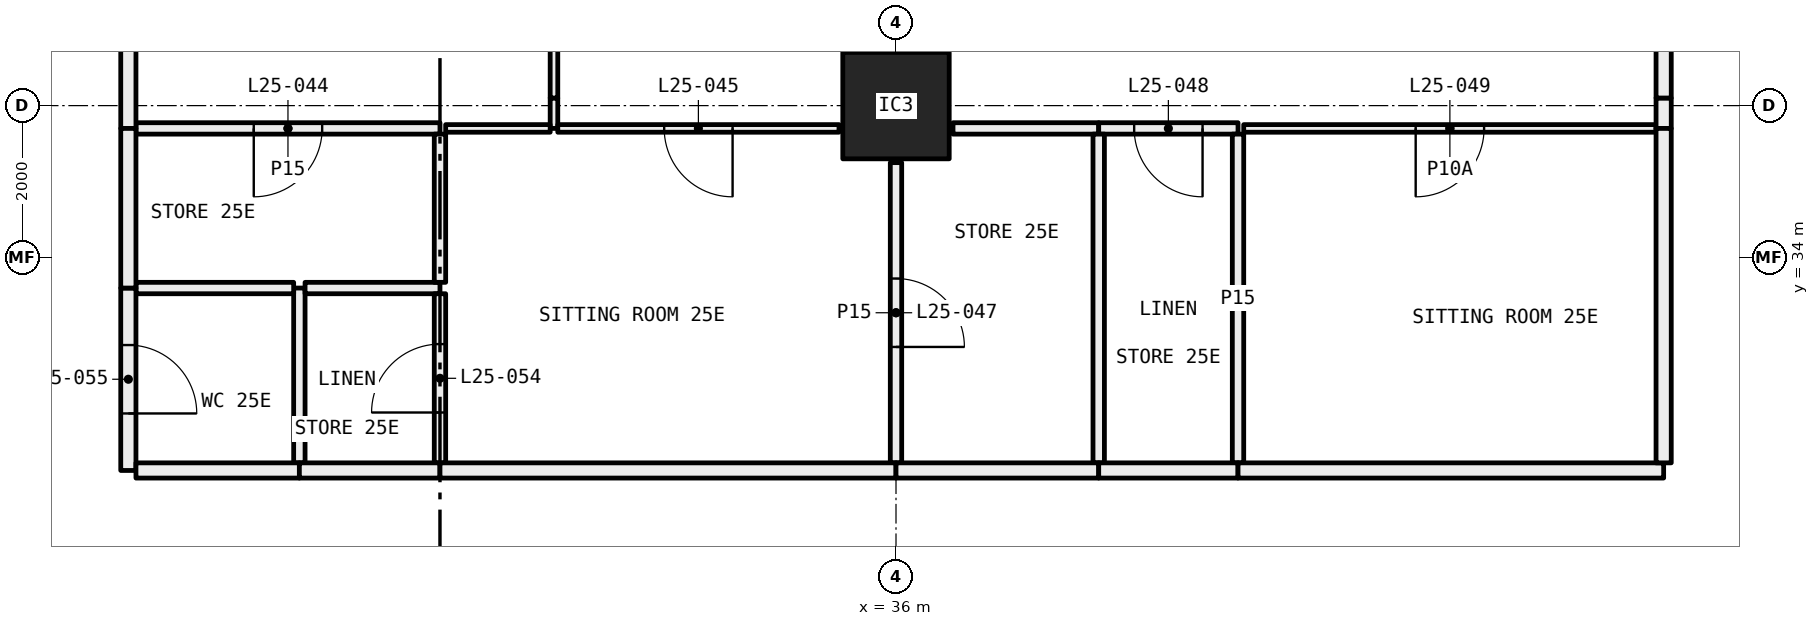
"""IFC4 building model, lengths in metres.
Left out: names, types, materials, properties, quantities, classifications, styles, units other than length and angle.
Written with IfcOpenShell. Run it as: python <this file> out.ifc"""

import sys

from ifc_helpers import new_model, si_unit, direction, frame, frame_2d, origin, origin_2d, place, context, subcontext, project, spatial, rectangle, hollow_rectangle, extrude, element, fill, save


model = new_model("IFC4")
c1 = context("Model", 3, precision=1e-05, world=origin(), true_north=direction((0.0, 1.0)))
c2 = subcontext(c1, "Body", "Model", "MODEL_VIEW")
j1 = project(units=[si_unit("LENGTHUNIT", "METRE"), si_unit("PLANEANGLEUNIT", "RADIAN")], contexts=[c1])
p1 = place(None, origin())
s1 = spatial("IfcSite", under=j1, at=p1, CompositionType="ELEMENT")
p2 = place(p1, origin())
s2 = spatial("IfcBuilding", under=s1, at=p2, CompositionType="ELEMENT")
p3 = place(p2, frame((0.0, 0.0, 100.05)))
s3 = spatial("IfcBuildingStorey", under=s2, at=p3, CompositionType="ELEMENT", Elevation=100.05)
p4 = place(p3, frame((36.0, 36.0, 0.0), z_axis=(0.0, 0.0, 1.0), x_axis=(1.0, 0.0, 0.0)))
e1 = element("IfcColumn", 1, at=p4, inside=s3, PredefinedType="COLUMN", context=c2, shape_type="SweptSolid", body=[
    extrude(hollow_rectangle(XDim=1.4, YDim=1.4, WallThickness=0.06, at=origin_2d()), origin(), (0.0, 0.0, 1.0), 3.05),
])
p5 = place(p3, frame((31.5, 35.7, 0.0), z_axis=(0.0, 0.0, 1.0), x_axis=(0.0, 1.0, 0.0)))
e2 = element("IfcWall", 2, at=p5, inside=s3, PredefinedType="PARTITIONING", context=c2, shape_type="SweptSolid", body=[
    extrude(rectangle(XDim=0.4, YDim=0.1, at=frame_2d((0.2, 0.0))), origin(), (0.0, 0.0, 1.0), 2.45),
])
p6 = place(p3, frame((31.5, 36.1, 0.0), z_axis=(0.0, 0.0, 1.0), x_axis=(0.0, 1.0, 0.0)))
e3 = element("IfcWall", 3, at=p6, inside=s3, PredefinedType="PARTITIONING", context=c2, shape_type="SweptSolid", body=[
    extrude(rectangle(XDim=5.825, YDim=0.1, at=frame_2d((2.913, 0.0))), origin(), (0.0, 0.0, 1.0), 3.05),
])
p7 = place(p6, frame((2.462, 0.0, 0.0)))
e4 = element("IfcOpeningElement", 4, at=p7, cuts=e3, PredefinedType="OPENING", context=c2, shape_type="SweptSolid", body=[
    extrude(rectangle(XDim=0.9, YDim=2.1, at=frame_2d((0.45, 1.05))), frame((0.0, 0.06, 0.0), z_axis=(0.0, -1.0, 0.0), x_axis=(1.0, 0.0, 0.0)), (0.0, 0.0, 1.0), 0.12),
])
p8 = place(p3, frame((26.0, 35.7, 0.0), z_axis=(0.0, 0.0, 1.0), x_axis=(1.0, 0.0, 0.0)))
e5 = element("IfcWall", 5, at=p8, inside=s3, PredefinedType="PARTITIONING", context=c2, shape_type="SweptSolid", body=[
    extrude(rectangle(XDim=4.0, YDim=0.15, at=frame_2d((2.0, 0.0))), origin(), (0.0, 0.0, 1.0), 3.05),
])
p9 = place(p8, frame((1.55, 0.0, 0.0)))
e6 = element("IfcOpeningElement", 6, at=p9, cuts=e5, PredefinedType="OPENING", context=c2, shape_type="SweptSolid", body=[
    extrude(rectangle(XDim=0.9, YDim=2.1, at=frame_2d((0.45, 1.05))), frame((0.0, 0.085, 0.0), z_axis=(0.0, -1.0, 0.0), x_axis=(1.0, 0.0, 0.0)), (0.0, 0.0, 1.0), 0.17),
])
p10 = place(p3, frame((30.075, 35.7, 0.0), z_axis=(0.0, 0.0, 1.0), x_axis=(1.0, 0.0, 0.0)))
e7 = element("IfcWall", 7, at=p10, inside=s3, PredefinedType="PARTITIONING", context=c2, shape_type="SweptSolid", body=[
    extrude(rectangle(XDim=1.375, YDim=0.1, at=frame_2d((0.688, 0.0))), origin(), (0.0, 0.0, 1.0), 3.05),
])
p11 = place(p3, frame((25.9, 41.9, 0.0), z_axis=(0.0, 0.0, 1.0), x_axis=(0.0, -1.0, 0.0)))
e8 = element("IfcWall", 8, at=p11, inside=s3, PredefinedType="PARTITIONING", context=c2, shape_type="SweptSolid", body=[
    extrude(rectangle(XDim=6.2, YDim=0.2, at=frame_2d((3.1, 0.0))), origin(), (0.0, 0.0, 1.0), 2.45),
])
p12 = place(p3, frame((31.55, 35.7, 0.0), z_axis=(0.0, 0.0, 1.0), x_axis=(1.0, 0.0, 0.0)))
e9 = element("IfcWall", 9, at=p12, inside=s3, PredefinedType="PARTITIONING", context=c2, shape_type="SweptSolid", body=[
    extrude(rectangle(XDim=3.7, YDim=0.1, at=frame_2d((1.85, 0.0))), origin(), (0.0, 0.0, 1.0), 3.05),
])
p13 = place(p12, frame((1.4, 0.0, 0.0)))
e10 = element("IfcOpeningElement", 10, at=p13, cuts=e9, PredefinedType="OPENING", context=c2, shape_type="SweptSolid", body=[
    extrude(rectangle(XDim=0.9, YDim=2.1, at=frame_2d((0.45, 1.05))), frame((0.0, 0.06, 0.0), z_axis=(0.0, -1.0, 0.0), x_axis=(1.0, 0.0, 0.0)), (0.0, 0.0, 1.0), 0.12),
])
p14 = place(p3, frame((28.15, 31.3, 0.0), z_axis=(0.0, 0.0, 1.0), x_axis=(0.0, 1.0, 0.0)))
e11 = element("IfcWall", 11, at=p14, inside=s3, PredefinedType="PARTITIONING", context=c2, shape_type="SweptSolid", body=[
    extrude(rectangle(XDim=2.3, YDim=0.15, at=frame_2d((1.15, 0.0))), origin(), (0.0, 0.0, 1.0), 3.05),
])
p15 = place(p3, frame((28.075, 33.6, 0.0), z_axis=(0.0, 0.0, 1.0), x_axis=(-1.0, 0.0, 0.0)))
e12 = element("IfcWall", 12, at=p15, inside=s3, PredefinedType="PARTITIONING", context=c2, shape_type="SweptSolid", body=[
    extrude(rectangle(XDim=2.075, YDim=0.15, at=frame_2d((1.038, 0.0))), origin(), (0.0, 0.0, 1.0), 3.05),
])
p16 = place(p3, frame((25.9, 33.6, 0.0), z_axis=(0.0, 0.0, 1.0), x_axis=(0.0, -1.0, 0.0)))
e13 = element("IfcWall", 13, at=p16, inside=s3, PredefinedType="PARTITIONING", context=c2, shape_type="SweptSolid", body=[
    extrude(rectangle(XDim=2.4, YDim=0.2, at=frame_2d((1.2, 0.0))), origin(), (0.0, 0.0, 1.0), 3.05),
])
p17 = place(p16, frame((0.75, 0.0, 0.0)))
e14 = element("IfcOpeningElement", 14, at=p17, cuts=e13, PredefinedType="OPENING", context=c2, shape_type="SweptSolid", body=[
    extrude(rectangle(XDim=0.9, YDim=2.1, at=frame_2d((0.45, 1.05))), frame((0.0, 0.11, 0.0), z_axis=(0.0, -1.0, 0.0), x_axis=(1.0, 0.0, 0.0)), (0.0, 0.0, 1.0), 0.22),
])
p18 = place(p3, frame((26.0, 31.2, 0.0), z_axis=(0.0, 0.0, 1.0), x_axis=(1.0, 0.0, 0.0)))
e15 = element("IfcWall", 15, at=p18, inside=s3, PredefinedType="PARTITIONING", context=c2, shape_type="SweptSolid", body=[
    extrude(rectangle(XDim=2.15, YDim=0.2, at=frame_2d((1.075, 0.0))), origin(), (0.0, 0.0, 1.0), 3.05),
])
p19 = place(p3, frame((30.0, 33.6, 0.0), z_axis=(0.0, 0.0, 1.0), x_axis=(-1.0, 0.0, 0.0)))
e16 = element("IfcWall", 16, at=p19, inside=s3, PredefinedType="PARTITIONING", context=c2, shape_type="SweptSolid", body=[
    extrude(rectangle(XDim=1.775, YDim=0.15, at=frame_2d((0.887, 0.0))), origin(), (0.0, 0.0, 1.0), 3.05),
])
p20 = place(p3, frame((30.0, 31.3, 0.0), z_axis=(0.0, 0.0, 1.0), x_axis=(0.0, 1.0, 0.0)))
e17 = element("IfcWall", 17, at=p20, inside=s3, PredefinedType="PARTITIONING", context=c2, shape_type="SweptSolid", body=[
    extrude(rectangle(XDim=2.225, YDim=0.15, at=frame_2d((1.112, 0.0))), origin(), (0.0, 0.0, 1.0), 3.05),
])
p21 = place(p20, frame((0.663, 0.0, 0.0)))
e18 = element("IfcOpeningElement", 18, at=p21, cuts=e17, PredefinedType="OPENING", context=c2, shape_type="SweptSolid", body=[
    extrude(rectangle(XDim=0.9, YDim=2.1, at=frame_2d((0.45, 1.05))), frame((0.0, 0.085, 0.0), z_axis=(0.0, -1.0, 0.0), x_axis=(1.0, 0.0, 0.0)), (0.0, 0.0, 1.0), 0.17),
])
p22 = place(p3, frame((28.15, 31.2, 0.0), z_axis=(0.0, 0.0, 1.0), x_axis=(1.0, 0.0, 0.0)))
e19 = element("IfcWall", 19, at=p22, inside=s3, PredefinedType="PARTITIONING", context=c2, shape_type="SweptSolid", body=[
    extrude(rectangle(XDim=1.85, YDim=0.2, at=frame_2d((0.925, 0.0))), origin(), (0.0, 0.0, 1.0), 3.05),
])
p23 = place(p3, frame((30.0, 33.675, 0.0), z_axis=(0.0, 0.0, 1.0), x_axis=(0.0, 1.0, 0.0)))
e20 = element("IfcWall", 20, at=p23, inside=s3, PredefinedType="PARTITIONING", context=c2, shape_type="SweptSolid", body=[
    extrude(rectangle(XDim=1.95, YDim=0.15, at=frame_2d((0.975, 0.0))), origin(), (0.0, 0.0, 1.0), 3.05),
])
p24 = place(p3, frame((25.9, 35.7, 0.0), z_axis=(0.0, 0.0, 1.0), x_axis=(0.0, -1.0, 0.0)))
e21 = element("IfcWall", 21, at=p24, inside=s3, PredefinedType="PARTITIONING", context=c2, shape_type="SweptSolid", body=[
    extrude(rectangle(XDim=2.1, YDim=0.2, at=frame_2d((1.05, 0.0))), origin(), (0.0, 0.0, 1.0), 3.05),
])
p25 = place(p3, frame((36.0, 31.3, 0.0), z_axis=(0.0, 0.0, 1.0), x_axis=(0.0, 1.0, 0.0)))
e22 = element("IfcWall", 22, at=p25, inside=s3, PredefinedType="PARTITIONING", context=c2, shape_type="SweptSolid", body=[
    extrude(rectangle(XDim=3.95, YDim=0.15, at=frame_2d((1.975, 0.0))), origin(), (0.0, 0.0, 1.0), 2.45),
])
p26 = place(p25, frame((1.525, 0.0, 0.0)))
e23 = element("IfcOpeningElement", 23, at=p26, cuts=e22, PredefinedType="OPENING", context=c2, shape_type="SweptSolid", body=[
    extrude(rectangle(XDim=0.9, YDim=2.1, at=frame_2d((0.45, 1.05))), frame((0.0, 0.085, 0.0), z_axis=(0.0, -1.0, 0.0), x_axis=(1.0, 0.0, 0.0)), (0.0, 0.0, 1.0), 0.17),
])
p27 = place(p3, frame((30.0, 31.2, 0.0), z_axis=(0.0, 0.0, 1.0), x_axis=(1.0, 0.0, 0.0)))
e24 = element("IfcWall", 24, at=p27, inside=s3, PredefinedType="PARTITIONING", context=c2, shape_type="SweptSolid", body=[
    extrude(rectangle(XDim=6.0, YDim=0.2, at=frame_2d((3.0, 0.0))), origin(), (0.0, 0.0, 1.0), 2.45),
])
p28 = place(p3, frame((36.75, 35.7, 0.0), z_axis=(0.0, 0.0, 1.0), x_axis=(1.0, 0.0, 0.0)))
e25 = element("IfcWall", 25, at=p28, inside=s3, PredefinedType="PARTITIONING", context=c2, shape_type="SweptSolid", body=[
    extrude(rectangle(XDim=1.917, YDim=0.15, at=frame_2d((0.958, 0.0))), origin(), (0.0, 0.0, 1.0), 3.05),
])
p29 = place(p3, frame((38.667, 35.7, 0.0), z_axis=(0.0, 0.0, 1.0), x_axis=(1.0, 0.0, 0.0)))
e26 = element("IfcWall", 26, at=p29, inside=s3, PredefinedType="PARTITIONING", context=c2, shape_type="SweptSolid", body=[
    extrude(rectangle(XDim=1.833, YDim=0.15, at=frame_2d((0.917, 0.0))), origin(), (0.0, 0.0, 1.0), 3.05),
])
p30 = place(p29, frame((0.467, 0.0, 0.0)))
e27 = element("IfcOpeningElement", 27, at=p30, cuts=e26, PredefinedType="OPENING", context=c2, shape_type="SweptSolid", body=[
    extrude(rectangle(XDim=0.9, YDim=2.1, at=frame_2d((0.45, 1.05))), frame((0.0, 0.085, 0.0), z_axis=(0.0, -1.0, 0.0), x_axis=(1.0, 0.0, 0.0)), (0.0, 0.0, 1.0), 0.17),
])
p31 = place(p3, frame((40.575, 35.7, 0.0), z_axis=(0.0, 0.0, 1.0), x_axis=(1.0, 0.0, 0.0)))
e28 = element("IfcWall", 28, at=p31, inside=s3, PredefinedType="PARTITIONING", context=c2, shape_type="SweptSolid", body=[
    extrude(rectangle(XDim=5.425, YDim=0.1, at=frame_2d((2.712, 0.0))), origin(), (0.0, 0.0, 1.0), 3.05),
])
p32 = place(p31, frame((2.262, 0.0, 0.0)))
e29 = element("IfcOpeningElement", 29, at=p32, cuts=e28, PredefinedType="OPENING", context=c2, shape_type="SweptSolid", body=[
    extrude(rectangle(XDim=0.9, YDim=2.1, at=frame_2d((0.45, 1.05))), frame((0.0, 0.06, 0.0), z_axis=(0.0, -1.0, 0.0), x_axis=(1.0, 0.0, 0.0)), (0.0, 0.0, 1.0), 0.12),
])
p33 = place(p3, frame((46.1, 35.7, 0.0), z_axis=(0.0, 0.0, 1.0), x_axis=(0.0, 1.0, 0.0)))
e30 = element("IfcWall", 30, at=p33, inside=s3, PredefinedType="PARTITIONING", context=c2, shape_type="SweptSolid", body=[
    extrude(rectangle(XDim=0.4, YDim=0.2, at=frame_2d((0.2, 0.0))), origin(), (0.0, 0.0, 1.0), 2.45),
])
p34 = place(p3, frame((46.1, 36.1, 0.0), z_axis=(0.0, 0.0, 1.0), x_axis=(0.0, 1.0, 0.0)))
e31 = element("IfcWall", 31, at=p34, inside=s3, PredefinedType="PARTITIONING", context=c2, shape_type="SweptSolid", body=[
    extrude(rectangle(XDim=5.8, YDim=0.2, at=frame_2d((2.9, 0.0))), origin(), (0.0, 0.0, 1.0), 3.05),
])
p35 = place(p3, frame((38.667, 31.3, 0.0), z_axis=(0.0, 0.0, 1.0), x_axis=(0.0, 1.0, 0.0)))
e32 = element("IfcWall", 32, at=p35, inside=s3, PredefinedType="PARTITIONING", context=c2, shape_type="SweptSolid", body=[
    extrude(rectangle(XDim=4.325, YDim=0.15, at=frame_2d((2.163, 0.0))), origin(), (0.0, 0.0, 1.0), 3.05),
])
p36 = place(p3, frame((36.0, 31.2, 0.0), z_axis=(0.0, 0.0, 1.0), x_axis=(1.0, 0.0, 0.0)))
e33 = element("IfcWall", 33, at=p36, inside=s3, PredefinedType="PARTITIONING", context=c2, shape_type="SweptSolid", body=[
    extrude(rectangle(XDim=2.667, YDim=0.2, at=frame_2d((1.333, 0.0))), origin(), (0.0, 0.0, 1.0), 2.45),
])
p37 = place(p3, frame((40.5, 31.3, 0.0), z_axis=(0.0, 0.0, 1.0), x_axis=(0.0, 1.0, 0.0)))
e34 = element("IfcWall", 34, at=p37, inside=s3, PredefinedType="PARTITIONING", context=c2, shape_type="SweptSolid", body=[
    extrude(rectangle(XDim=4.325, YDim=0.15, at=frame_2d((2.163, 0.0))), origin(), (0.0, 0.0, 1.0), 3.05),
])
p38 = place(p3, frame((38.667, 31.2, 0.0), z_axis=(0.0, 0.0, 1.0), x_axis=(1.0, 0.0, 0.0)))
e35 = element("IfcWall", 35, at=p38, inside=s3, PredefinedType="PARTITIONING", context=c2, shape_type="SweptSolid", body=[
    extrude(rectangle(XDim=1.833, YDim=0.2, at=frame_2d((0.917, 0.0))), origin(), (0.0, 0.0, 1.0), 3.05),
])
p39 = place(p3, frame((40.5, 31.2, 0.0), z_axis=(0.0, 0.0, 1.0), x_axis=(1.0, 0.0, 0.0)))
e36 = element("IfcWall", 36, at=p39, inside=s3, PredefinedType="PARTITIONING", context=c2, shape_type="SweptSolid", body=[
    extrude(rectangle(XDim=5.6, YDim=0.2, at=frame_2d((2.8, 0.0))), origin(), (0.0, 0.0, 1.0), 3.05),
])
p40 = place(p3, frame((46.1, 31.3, 0.0), z_axis=(0.0, 0.0, 1.0), x_axis=(0.0, 1.0, 0.0)))
e37 = element("IfcWall", 37, at=p40, inside=s3, PredefinedType="PARTITIONING", context=c2, shape_type="SweptSolid", body=[
    extrude(rectangle(XDim=4.4, YDim=0.2, at=frame_2d((2.2, 0.0))), origin(), (0.0, 0.0, 1.0), 3.05),
])
p41 = place(p9, frame((0.9, 0.0, 0.0), x_axis=(-1.0, 0.0, 0.0)))
e38 = element("IfcDoor", 38, at=p41, inside=s3, OperationType="SINGLE_SWING_LEFT", PredefinedType="DOOR", context=c2, shape_type="SweptSolid", body=[
    extrude(rectangle(XDim=0.9, YDim=2.1, at=frame_2d((0.45, 1.05))), frame((0.0, 0.025, 0.0), z_axis=(0.0, -1.0, 0.0), x_axis=(1.0, 0.0, 0.0)), (0.0, 0.0, 1.0), 0.05),
])
fill(e6, e38)
p42 = place(p13, frame((0.9, 0.0, 0.0), x_axis=(-1.0, 0.0, 0.0)))
e39 = element("IfcDoor", 39, at=p42, inside=s3, OperationType="SINGLE_SWING_RIGHT", PredefinedType="DOOR", context=c2, shape_type="SweptSolid", body=[
    extrude(rectangle(XDim=0.9, YDim=2.1, at=frame_2d((0.45, 1.05))), frame((0.0, 0.025, 0.0), z_axis=(0.0, -1.0, 0.0), x_axis=(1.0, 0.0, 0.0)), (0.0, 0.0, 1.0), 0.05),
])
fill(e10, e39)
p43 = place(p26, frame((0.9, 0.0, 0.0), x_axis=(-1.0, 0.0, 0.0)))
e40 = element("IfcDoor", 40, at=p43, inside=s3, OperationType="SINGLE_SWING_LEFT", PredefinedType="DOOR", context=c2, shape_type="SweptSolid", body=[
    extrude(rectangle(XDim=0.9, YDim=2.1, at=frame_2d((0.45, 1.05))), frame((0.0, 0.025, 0.0), z_axis=(0.0, -1.0, 0.0), x_axis=(1.0, 0.0, 0.0)), (0.0, 0.0, 1.0), 0.05),
])
fill(e23, e40)
p44 = place(p30, frame((0.9, 0.0, 0.0), x_axis=(-1.0, 0.0, 0.0)))
e41 = element("IfcDoor", 41, at=p44, inside=s3, OperationType="SINGLE_SWING_RIGHT", PredefinedType="DOOR", context=c2, shape_type="SweptSolid", body=[
    extrude(rectangle(XDim=0.9, YDim=2.1, at=frame_2d((0.45, 1.05))), frame((0.0, 0.025, 0.0), z_axis=(0.0, -1.0, 0.0), x_axis=(1.0, 0.0, 0.0)), (0.0, 0.0, 1.0), 0.05),
])
fill(e27, e41)
p45 = place(p32, frame((0.9, 0.0, 0.0), x_axis=(-1.0, 0.0, 0.0)))
e42 = element("IfcDoor", 42, at=p45, inside=s3, OperationType="SINGLE_SWING_LEFT", PredefinedType="DOOR", context=c2, shape_type="SweptSolid", body=[
    extrude(rectangle(XDim=0.9, YDim=2.1, at=frame_2d((0.45, 1.05))), frame((0.0, 0.025, 0.0), z_axis=(0.0, -1.0, 0.0), x_axis=(1.0, 0.0, 0.0)), (0.0, 0.0, 1.0), 0.05),
])
fill(e29, e42)
p46 = place(p21, origin())
e43 = element("IfcDoor", 43, at=p46, inside=s3, OperationType="SINGLE_SWING_RIGHT", PredefinedType="DOOR", context=c2, shape_type="SweptSolid", body=[
    extrude(rectangle(XDim=0.9, YDim=2.1, at=frame_2d((0.45, 1.05))), frame((0.0, 0.025, 0.0), z_axis=(0.0, -1.0, 0.0), x_axis=(1.0, 0.0, 0.0)), (0.0, 0.0, 1.0), 0.05),
])
fill(e18, e43)
p47 = place(p17, origin())
e44 = element("IfcDoor", 44, at=p47, inside=s3, OperationType="SINGLE_SWING_LEFT", PredefinedType="DOOR", context=c2, shape_type="SweptSolid", body=[
    extrude(rectangle(XDim=0.9, YDim=2.1, at=frame_2d((0.45, 1.05))), frame((0.0, 0.025, 0.0), z_axis=(0.0, -1.0, 0.0), x_axis=(1.0, 0.0, 0.0)), (0.0, 0.0, 1.0), 0.05),
])
fill(e14, e44)
save(model, sys.argv[1])
